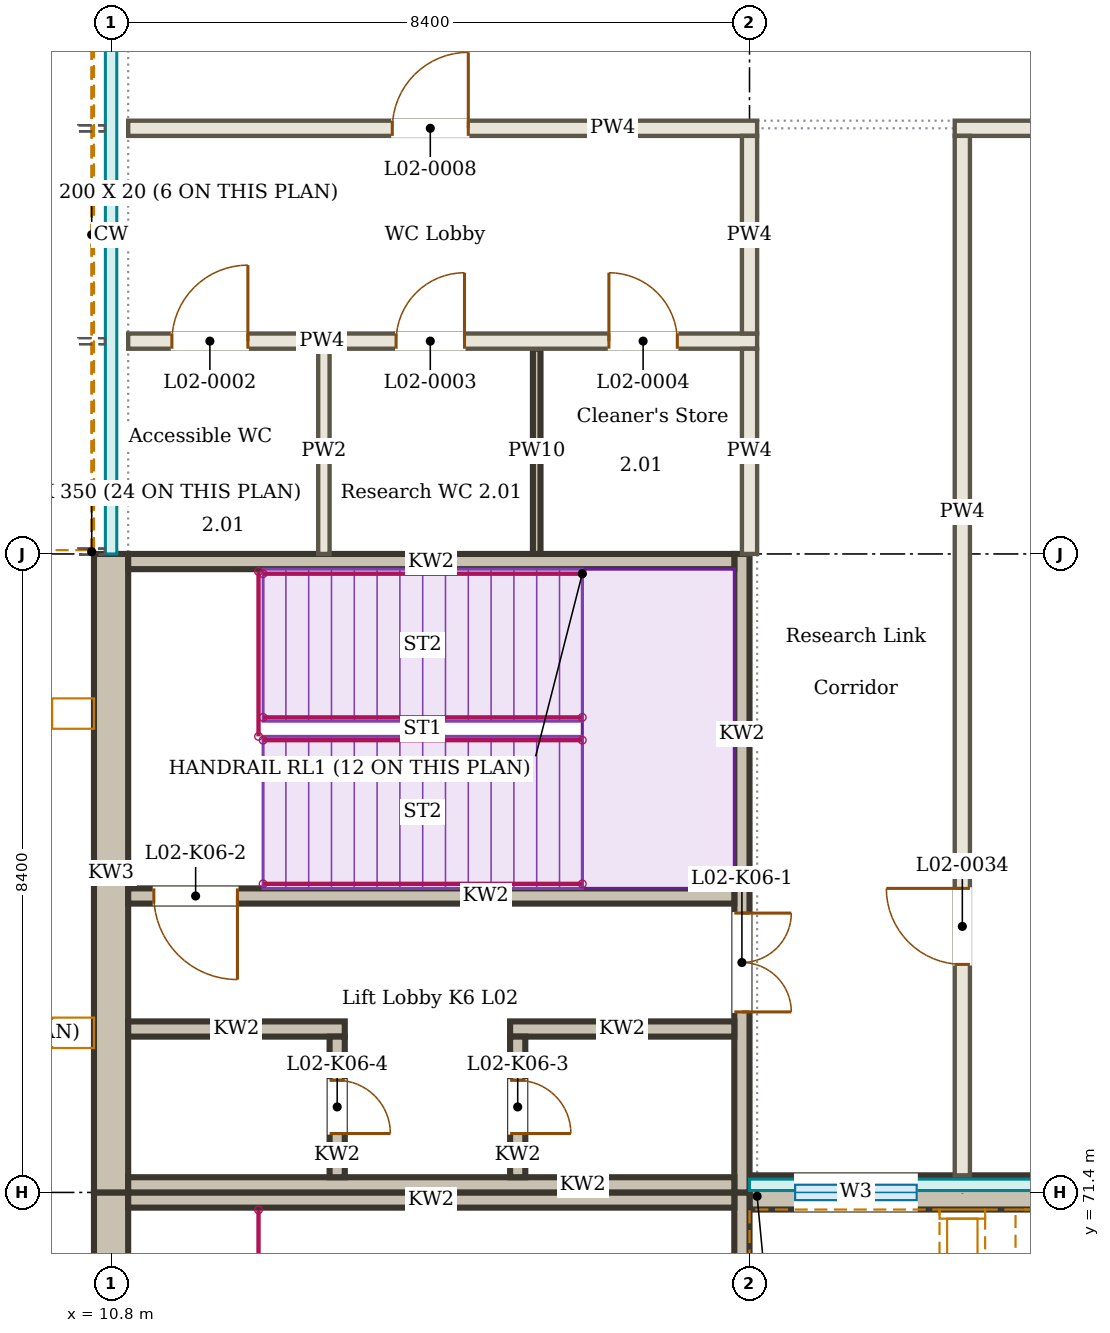
"""IFC4 building model, lengths in metres.
Left out: names, types, materials, properties, quantities, classifications, styles, units other than length and angle.
Written with IfcOpenShell. Run it as: python <this file> out.ifc"""

import sys

from ifc_helpers import new_model, si_unit, direction, frame, frame_2d, origin, place, context, subcontext, project, spatial, rectangle, extrude, element, fill, save


model = new_model("IFC4")
c1 = context("Model", 3, precision=1e-05, world=origin(), true_north=direction((0.0, 1.0)))
c2 = subcontext(c1, "Body", "Model", "MODEL_VIEW")
j1 = project(units=[si_unit("LENGTHUNIT", "METRE"), si_unit("PLANEANGLEUNIT", "RADIAN")], contexts=[c1])
p1 = place(None, origin())
s1 = spatial("IfcSite", under=j1, at=p1, CompositionType="ELEMENT")
p2 = place(p1, origin())
s2 = spatial("IfcBuilding", under=s1, at=p2, CompositionType="ELEMENT")
p3 = place(p2, frame((0.0, 0.0, 9.0)))
s3 = spatial("IfcBuildingStorey", under=s2, at=p3, CompositionType="ELEMENT", Elevation=9.0)
p4 = place(p3, frame((19.2, 71.4, 0.0), z_axis=(0.0, 0.0, 1.0), x_axis=(1.0, 0.0, 0.0)))
e1 = element("IfcWall", 1, at=p4, inside=s3, PredefinedType="SOLIDWALL", context=c2, shape_type="SweptSolid", body=[
    extrude(rectangle(XDim=8.205, YDim=0.45, at=frame_2d((4.102, 0.0))), origin(), (0.0, 0.0, 1.0), 3.85),
])
p5 = place(p4, frame((0.6, 0.0, 2.7)))
e2 = element("IfcOpeningElement", 2, at=p5, cuts=e1, PredefinedType="OPENING", context=c2, shape_type="SweptSolid", body=[
    extrude(rectangle(XDim=1.6, YDim=0.6, at=frame_2d((0.8, 0.3))), frame((0.0, 0.235, 0.0), z_axis=(0.0, -1.0, 0.0), x_axis=(1.0, 0.0, 0.0)), (0.0, 0.0, 1.0), 0.47),
])
p6 = place(p4, frame((3.75, 0.0, 1.0)))
e3 = element("IfcOpeningElement", 3, at=p6, cuts=e1, PredefinedType="OPENING", context=c2, shape_type="SweptSolid", body=[
    extrude(rectangle(XDim=0.9, YDim=1.2, at=frame_2d((0.45, 0.6))), frame((0.0, 0.235, 0.0), z_axis=(0.0, -1.0, 0.0), x_axis=(1.0, 0.0, 0.0)), (0.0, 0.0, 1.0), 0.47),
])
p7 = place(p4, frame((6.55, 0.0, 1.0)))
e4 = element("IfcOpeningElement", 4, at=p7, cuts=e1, PredefinedType="OPENING", context=c2, shape_type="SweptSolid", body=[
    extrude(rectangle(XDim=0.9, YDim=1.2, at=frame_2d((0.45, 0.6))), frame((0.0, 0.235, 0.0), z_axis=(0.0, -1.0, 0.0), x_axis=(1.0, 0.0, 0.0)), (0.0, 0.0, 1.0), 0.47),
])
p8 = place(p3, frame((19.2, 71.24, 3.87), z_axis=(0.0, 0.0, 1.0), x_axis=(1.0, 0.0, 0.0)))
e5 = element("IfcWall", 5, at=p8, inside=s3, PredefinedType="SOLIDWALL", context=c2, shape_type="SweptSolid", body=[
    extrude(rectangle(XDim=8.205, YDim=0.13, at=frame_2d((4.102, 0.0))), origin(), (0.0, 0.0, 1.0), 0.63),
])
p9 = place(p3, frame((10.64, 79.8, 3.87), z_axis=(0.0, 0.0, 1.0), x_axis=(0.0, 1.0, 0.0)))
e6 = element("IfcWall", 6, at=p9, inside=s3, PredefinedType="SOLIDWALL", context=c2, shape_type="SweptSolid", body=[
    extrude(rectangle(XDim=8.4, YDim=0.13, at=frame_2d((4.2, 0.0))), origin(), (0.0, 0.0, 1.0), 0.63),
])
p10 = place(p3, frame((11.025, 82.6, 0.0), z_axis=(0.0, 0.0, 1.0), x_axis=(1.0, 0.0, 0.0)))
e7 = element("IfcWall", 7, at=p10, inside=s3, PredefinedType="PARTITIONING", context=c2, shape_type="SweptSolid", body=[
    extrude(rectangle(XDim=8.275, YDim=0.2, at=frame_2d((4.138, 0.0))), origin(), (0.0, 0.0, 1.0), 3.8),
])
p11 = place(p10, frame((0.575, 0.0, 0.0)))
e8 = element("IfcOpeningElement", 8, at=p11, cuts=e7, PredefinedType="OPENING", context=c2, shape_type="SweptSolid", body=[
    extrude(rectangle(XDim=1.0, YDim=2.1, at=frame_2d((0.5, 1.05))), frame((0.0, 0.11, 0.0), z_axis=(0.0, -1.0, 0.0), x_axis=(1.0, 0.0, 0.0)), (0.0, 0.0, 1.0), 0.22),
])
p12 = place(p10, frame((3.525, 0.0, 0.0)))
e9 = element("IfcOpeningElement", 9, at=p12, cuts=e7, PredefinedType="OPENING", context=c2, shape_type="SweptSolid", body=[
    extrude(rectangle(XDim=0.9, YDim=2.1, at=frame_2d((0.45, 1.05))), frame((0.0, 0.11, 0.0), z_axis=(0.0, -1.0, 0.0), x_axis=(1.0, 0.0, 0.0)), (0.0, 0.0, 1.0), 0.22),
])
p13 = place(p10, frame((6.325, 0.0, 0.0)))
e10 = element("IfcOpeningElement", 10, at=p13, cuts=e7, PredefinedType="OPENING", context=c2, shape_type="SweptSolid", body=[
    extrude(rectangle(XDim=0.9, YDim=2.1, at=frame_2d((0.45, 1.05))), frame((0.0, 0.11, 0.0), z_axis=(0.0, -1.0, 0.0), x_axis=(1.0, 0.0, 0.0)), (0.0, 0.0, 1.0), 0.22),
])
p14 = place(p3, frame((11.025, 85.4, 0.0), z_axis=(0.0, 0.0, 1.0), x_axis=(1.0, 0.0, 0.0)))
e11 = element("IfcWall", 11, at=p14, inside=s3, PredefinedType="PARTITIONING", context=c2, shape_type="SweptSolid", body=[
    extrude(rectangle(XDim=8.275, YDim=0.2, at=frame_2d((4.138, 0.0))), origin(), (0.0, 0.0, 1.0), 3.8),
])
p15 = place(p14, frame((3.475, 0.0, 0.0)))
e12 = element("IfcOpeningElement", 12, at=p15, cuts=e11, PredefinedType="OPENING", context=c2, shape_type="SweptSolid", body=[
    extrude(rectangle(XDim=1.0, YDim=2.1, at=frame_2d((0.5, 1.05))), frame((0.0, 0.11, 0.0), z_axis=(0.0, -1.0, 0.0), x_axis=(1.0, 0.0, 0.0)), (0.0, 0.0, 1.0), 0.22),
])
p16 = place(p3, frame((21.9, 85.4, 0.0), z_axis=(0.0, 0.0, 1.0), x_axis=(1.0, 0.0, 0.0)))
e13 = element("IfcWall", 13, at=p16, inside=s3, PredefinedType="PARTITIONING", context=c2, shape_type="SweptSolid", body=[
    extrude(rectangle(XDim=22.65, YDim=0.2, at=frame_2d((11.325, 0.0))), origin(), (0.0, 0.0, 1.0), 3.8),
])
p17 = place(p16, frame((15.2, 0.0, 0.0)))
e14 = element("IfcOpeningElement", 14, at=p17, cuts=e13, PredefinedType="OPENING", context=c2, shape_type="SweptSolid", body=[
    extrude(rectangle(XDim=1.8, YDim=2.1, at=frame_2d((0.9, 1.05))), frame((0.0, 0.11, 0.0), z_axis=(0.0, -1.0, 0.0), x_axis=(1.0, 0.0, 0.0)), (0.0, 0.0, 1.0), 0.22),
])
p18 = place(p3, frame((13.6, 79.8, 0.0), z_axis=(0.0, 0.0, 1.0), x_axis=(0.0, 1.0, 0.0)))
e15 = element("IfcWall", 15, at=p18, inside=s3, PredefinedType="PARTITIONING", context=c2, shape_type="SweptSolid", body=[
    extrude(rectangle(XDim=2.7, YDim=0.15, at=frame_2d((1.35, 0.0))), origin(), (0.0, 0.0, 1.0), 3.95),
])
p19 = place(p3, frame((16.4, 79.8, 0.0), z_axis=(0.0, 0.0, 1.0), x_axis=(0.0, 1.0, 0.0)))
e16 = element("IfcWall", 16, at=p19, inside=s3, PredefinedType="SOLIDWALL", context=c2, shape_type="SweptSolid", body=[
    extrude(rectangle(XDim=2.7, YDim=0.1, at=frame_2d((1.35, 0.0))), origin(), (0.0, 0.0, 1.0), 3.95),
])
p20 = place(p3, frame((19.2, 79.8, 0.0), z_axis=(0.0, 0.0, 1.0), x_axis=(0.0, 1.0, 0.0)))
e17 = element("IfcWall", 17, at=p20, inside=s3, PredefinedType="PARTITIONING", context=c2, shape_type="SweptSolid", body=[
    extrude(rectangle(XDim=2.7, YDim=0.2, at=frame_2d((1.35, 0.0))), origin(), (0.0, 0.0, 1.0), 3.8),
])
p21 = place(p3, frame((19.2, 82.7, 0.0), z_axis=(0.0, 0.0, 1.0), x_axis=(0.0, 1.0, 0.0)))
e18 = element("IfcWall", 18, at=p21, inside=s3, PredefinedType="PARTITIONING", context=c2, shape_type="SweptSolid", body=[
    extrude(rectangle(XDim=2.6, YDim=0.2, at=frame_2d((1.3, 0.0))), origin(), (0.0, 0.0, 1.0), 3.8),
])
p22 = place(p3, frame((22.0, 71.625, 0.0), z_axis=(0.0, 0.0, 1.0), x_axis=(0.0, 1.0, 0.0)))
e19 = element("IfcWall", 19, at=p22, inside=s3, PredefinedType="PARTITIONING", context=c2, shape_type="SweptSolid", body=[
    extrude(rectangle(XDim=13.675, YDim=0.2, at=frame_2d((6.837, 0.0))), origin(), (0.0, 0.0, 1.0), 3.8),
])
p23 = place(p22, frame((2.775, 0.0, 0.0)))
e20 = element("IfcOpeningElement", 20, at=p23, cuts=e19, PredefinedType="OPENING", context=c2, shape_type="SweptSolid", body=[
    extrude(rectangle(XDim=1.0, YDim=2.1, at=frame_2d((0.5, 1.05))), frame((0.0, 0.11, 0.0), z_axis=(0.0, -1.0, 0.0), x_axis=(1.0, 0.0, 0.0)), (0.0, 0.0, 1.0), 0.22),
])
p24 = place(p3, frame((19.1, 71.4, 0.0), z_axis=(0.0, 0.0, 1.0), x_axis=(0.0, -1.0, 0.0)))
e21 = element("IfcWall", 21, at=p24, inside=s3, PredefinedType="SOLIDWALL", context=c2, shape_type="SweptSolid", body=[
    extrude(rectangle(XDim=4.6, YDim=0.2, at=frame_2d((2.3, 0.0))), origin(), (0.0, 0.0, 1.0), 3.0),
])
p25 = place(p3, frame((10.8, 71.4, 0.0), z_axis=(0.0, 0.0, 1.0), x_axis=(0.0, -1.0, 0.0)))
e22 = element("IfcWall", 22, at=p25, inside=s3, PredefinedType="SOLIDWALL", context=c2, shape_type="SweptSolid", body=[
    extrude(rectangle(XDim=4.6, YDim=0.45, at=frame_2d((2.3, 0.0))), origin(), (0.0, 0.0, 1.0), 3.0),
])
p26 = place(p3, frame((19.0, 71.3, 0.0), z_axis=(0.0, 0.0, 1.0), x_axis=(-1.0, 0.0, 0.0)))
e23 = element("IfcWall", 23, at=p26, inside=s3, PredefinedType="SOLIDWALL", context=c2, shape_type="SweptSolid", body=[
    extrude(rectangle(XDim=7.975, YDim=0.2, at=frame_2d((3.988, 0.0))), origin(), (0.0, 0.0, 1.0), 3.0),
])
p27 = place(p3, frame((19.1, 79.8, 0.0), z_axis=(0.0, 0.0, 1.0), x_axis=(0.0, -1.0, 0.0)))
e24 = element("IfcWall", 24, at=p27, inside=s3, PredefinedType="SOLIDWALL", context=c2, shape_type="SweptSolid", body=[
    extrude(rectangle(XDim=8.4, YDim=0.2, at=frame_2d((4.2, 0.0))), origin(), (0.0, 0.0, 1.0), 4.5),
])
p28 = place(p27, frame((4.725, 0.0, 0.0)))
e25 = element("IfcOpeningElement", 25, at=p28, cuts=e24, PredefinedType="OPENING", context=c2, shape_type="SweptSolid", body=[
    extrude(rectangle(XDim=1.3, YDim=2.1, at=frame_2d((0.65, 1.05))), frame((0.0, 0.11, 0.0), z_axis=(0.0, -1.0, 0.0), x_axis=(1.0, 0.0, 0.0)), (0.0, 0.0, 1.0), 0.22),
])
p29 = place(p3, frame((10.8, 79.8, 0.0), z_axis=(0.0, 0.0, 1.0), x_axis=(0.0, -1.0, 0.0)))
e26 = element("IfcWall", 26, at=p29, inside=s3, PredefinedType="SOLIDWALL", context=c2, shape_type="SweptSolid", body=[
    extrude(rectangle(XDim=8.4, YDim=0.45, at=frame_2d((4.2, 0.0))), origin(), (0.0, 0.0, 1.0), 4.5),
])
for number, where, z_axis, x_axis in (
    (27, (19.0, 79.7, 0.0), (0.0, 0.0, 1.0), (-1.0, 0.0, 0.0)),
    (28, (19.0, 71.5, 0.0), (0.0, 0.0, 1.0), (-1.0, 0.0, 0.0)),
):
    element("IfcWall", number, at=place(p3, frame(where, z_axis=z_axis, x_axis=x_axis)), inside=s3, PredefinedType="SOLIDWALL", context=c2, shape_type="SweptSolid", body=[
        extrude(rectangle(XDim=7.975, YDim=0.2, at=frame_2d((3.988, 0.0))), origin(), (0.0, 0.0, 1.0), 4.5),
    ])
p30 = place(p3, frame((19.0, 75.3, 0.0), z_axis=(0.0, 0.0, 1.0), x_axis=(-1.0, 0.0, 0.0)))
e29 = element("IfcWall", 29, at=p30, inside=s3, PredefinedType="SOLIDWALL", context=c2, shape_type="SweptSolid", body=[
    extrude(rectangle(XDim=7.975, YDim=0.2, at=frame_2d((3.988, 0.0))), origin(), (0.0, 0.0, 1.0), 4.5),
])
p31 = place(p30, frame((6.538, 0.0, 0.0)))
e30 = element("IfcOpeningElement", 30, at=p31, cuts=e29, PredefinedType="OPENING", context=c2, shape_type="SweptSolid", body=[
    extrude(rectangle(XDim=1.1, YDim=2.1, at=frame_2d((0.55, 1.05))), frame((0.0, 0.11, 0.0), z_axis=(0.0, -1.0, 0.0), x_axis=(1.0, 0.0, 0.0)), (0.0, 0.0, 1.0), 0.22),
])
p32 = place(p3, frame((19.0, 73.55, 0.0), z_axis=(0.0, 0.0, 1.0), x_axis=(-1.0, 0.0, 0.0)))
e31 = element("IfcWall", 31, at=p32, inside=s3, PredefinedType="SOLIDWALL", context=c2, shape_type="SweptSolid", body=[
    extrude(rectangle(XDim=2.95, YDim=0.2, at=frame_2d((1.475, 0.0))), origin(), (0.0, 0.0, 1.0), 4.35),
])
p33 = place(p3, frame((13.875, 73.55, 0.0), z_axis=(0.0, 0.0, 1.0), x_axis=(-1.0, 0.0, 0.0)))
e32 = element("IfcWall", 32, at=p33, inside=s3, PredefinedType="SOLIDWALL", context=c2, shape_type="SweptSolid", body=[
    extrude(rectangle(XDim=2.85, YDim=0.2, at=frame_2d((1.425, 0.0))), origin(), (0.0, 0.0, 1.0), 4.35),
])
p34 = place(p3, frame((16.15, 73.45, 0.0), z_axis=(0.0, 0.0, 1.0), x_axis=(0.0, -1.0, 0.0)))
e33 = element("IfcWall", 33, at=p34, inside=s3, PredefinedType="SOLIDWALL", context=c2, shape_type="SweptSolid", body=[
    extrude(rectangle(XDim=1.85, YDim=0.2, at=frame_2d((0.925, 0.0))), origin(), (0.0, 0.0, 1.0), 4.35),
])
p35 = place(p34, frame((0.575, 0.0, 0.0)))
e34 = element("IfcOpeningElement", 34, at=p35, cuts=e33, PredefinedType="OPENING", context=c2, shape_type="SweptSolid", body=[
    extrude(rectangle(XDim=0.7, YDim=2.1, at=frame_2d((0.35, 1.05))), frame((0.0, 0.11, 0.0), z_axis=(0.0, -1.0, 0.0), x_axis=(1.0, 0.0, 0.0)), (0.0, 0.0, 1.0), 0.22),
])
p36 = place(p3, frame((13.775, 73.45, 0.0), z_axis=(0.0, 0.0, 1.0), x_axis=(0.0, -1.0, 0.0)))
e35 = element("IfcWall", 35, at=p36, inside=s3, PredefinedType="SOLIDWALL", context=c2, shape_type="SweptSolid", body=[
    extrude(rectangle(XDim=1.85, YDim=0.2, at=frame_2d((0.925, 0.0))), origin(), (0.0, 0.0, 1.0), 4.35),
])
p37 = place(p36, frame((0.575, 0.0, 0.0)))
e36 = element("IfcOpeningElement", 36, at=p37, cuts=e35, PredefinedType="OPENING", context=c2, shape_type="SweptSolid", body=[
    extrude(rectangle(XDim=0.7, YDim=2.1, at=frame_2d((0.35, 1.05))), frame((0.0, 0.11, 0.0), z_axis=(0.0, -1.0, 0.0), x_axis=(1.0, 0.0, 0.0)), (0.0, 0.0, 1.0), 0.22),
])
p38 = place(p5, origin())
e37 = element("IfcWindow", 37, at=p38, inside=s3, PartitioningType="SINGLE_PANEL", PredefinedType="WINDOW", context=c2, shape_type="SweptSolid", body=[
    extrude(rectangle(XDim=1.6, YDim=0.6, at=frame_2d((0.8, 0.3))), frame((0.0, 0.03, 0.0), z_axis=(0.0, -1.0, 0.0), x_axis=(1.0, 0.0, 0.0)), (0.0, 0.0, 1.0), 0.06),
])
fill(e2, e37)
p39 = place(p11, origin())
e38 = element("IfcDoor", 38, at=p39, inside=s3, OperationType="SINGLE_SWING_RIGHT", PredefinedType="DOOR", context=c2, shape_type="SweptSolid", body=[
    extrude(rectangle(XDim=1.0, YDim=2.1, at=frame_2d((0.5, 1.05))), frame((0.0, 0.025, 0.0), z_axis=(0.0, -1.0, 0.0), x_axis=(1.0, 0.0, 0.0)), (0.0, 0.0, 1.0), 0.05),
])
fill(e8, e38)
p40 = place(p12, origin())
e39 = element("IfcDoor", 39, at=p40, inside=s3, OperationType="SINGLE_SWING_RIGHT", PredefinedType="DOOR", context=c2, shape_type="SweptSolid", body=[
    extrude(rectangle(XDim=0.9, YDim=2.1, at=frame_2d((0.45, 1.05))), frame((0.0, 0.025, 0.0), z_axis=(0.0, -1.0, 0.0), x_axis=(1.0, 0.0, 0.0)), (0.0, 0.0, 1.0), 0.05),
])
fill(e9, e39)
p41 = place(p13, origin())
e40 = element("IfcDoor", 40, at=p41, inside=s3, OperationType="SINGLE_SWING_LEFT", PredefinedType="DOOR", context=c2, shape_type="SweptSolid", body=[
    extrude(rectangle(XDim=0.9, YDim=2.1, at=frame_2d((0.45, 1.05))), frame((0.0, 0.025, 0.0), z_axis=(0.0, -1.0, 0.0), x_axis=(1.0, 0.0, 0.0)), (0.0, 0.0, 1.0), 0.05),
])
fill(e10, e40)
p42 = place(p15, origin())
e41 = element("IfcDoor", 41, at=p42, inside=s3, OperationType="SINGLE_SWING_RIGHT", PredefinedType="DOOR", context=c2, shape_type="SweptSolid", body=[
    extrude(rectangle(XDim=1.0, YDim=2.1, at=frame_2d((0.5, 1.05))), frame((0.0, 0.025, 0.0), z_axis=(0.0, -1.0, 0.0), x_axis=(1.0, 0.0, 0.0)), (0.0, 0.0, 1.0), 0.05),
])
fill(e12, e41)
p43 = place(p23, origin())
e42 = element("IfcDoor", 42, at=p43, inside=s3, OperationType="SINGLE_SWING_RIGHT", PredefinedType="DOOR", context=c2, shape_type="SweptSolid", body=[
    extrude(rectangle(XDim=1.0, YDim=2.1, at=frame_2d((0.5, 1.05))), frame((0.0, 0.025, 0.0), z_axis=(0.0, -1.0, 0.0), x_axis=(1.0, 0.0, 0.0)), (0.0, 0.0, 1.0), 0.05),
])
fill(e20, e42)
p44 = place(p28, origin())
e43 = element("IfcDoor", 43, at=p44, inside=s3, OperationType="DOUBLE_DOOR_DOUBLE_SWING", PredefinedType="DOOR", context=c2, shape_type="SweptSolid", body=[
    extrude(rectangle(XDim=1.3, YDim=2.1, at=frame_2d((0.65, 1.05))), frame((0.0, 0.025, 0.0), z_axis=(0.0, -1.0, 0.0), x_axis=(1.0, 0.0, 0.0)), (0.0, 0.0, 1.0), 0.05),
])
fill(e25, e43)
p45 = place(p31, origin())
e44 = element("IfcDoor", 44, at=p45, inside=s3, OperationType="SINGLE_SWING_LEFT", PredefinedType="DOOR", context=c2, shape_type="SweptSolid", body=[
    extrude(rectangle(XDim=1.1, YDim=2.1, at=frame_2d((0.55, 1.05))), frame((0.0, 0.025, 0.0), z_axis=(0.0, -1.0, 0.0), x_axis=(1.0, 0.0, 0.0)), (0.0, 0.0, 1.0), 0.05),
])
fill(e30, e44)
p46 = place(p35, origin())
e45 = element("IfcDoor", 45, at=p46, inside=s3, OperationType="SINGLE_SWING_RIGHT", PredefinedType="DOOR", context=c2, shape_type="SweptSolid", body=[
    extrude(rectangle(XDim=0.7, YDim=2.1, at=frame_2d((0.35, 1.05))), frame((0.0, 0.025, 0.0), z_axis=(0.0, -1.0, 0.0), x_axis=(1.0, 0.0, 0.0)), (0.0, 0.0, 1.0), 0.05),
])
fill(e34, e45)
p47 = place(p37, origin())
e46 = element("IfcDoor", 46, at=p47, inside=s3, OperationType="SINGLE_SWING_RIGHT", PredefinedType="DOOR", context=c2, shape_type="SweptSolid", body=[
    extrude(rectangle(XDim=0.7, YDim=2.1, at=frame_2d((0.35, 1.05))), frame((0.0, 0.025, 0.0), z_axis=(0.0, -1.0, 0.0), x_axis=(1.0, 0.0, 0.0)), (0.0, 0.0, 1.0), 0.05),
])
fill(e36, e46)
save(model, sys.argv[1])
